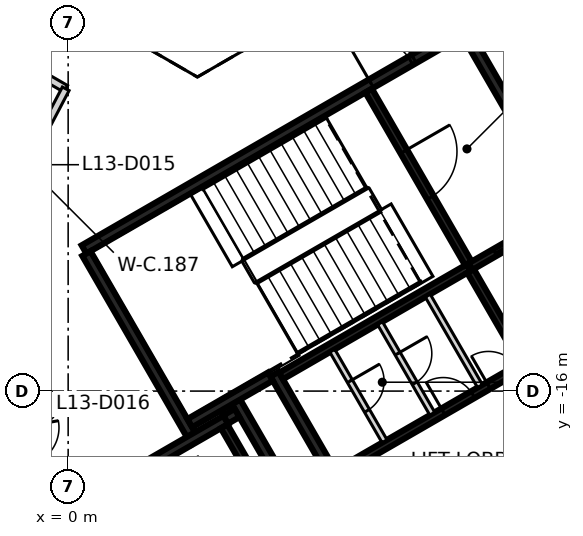
"""IFC4 building model, lengths in metres.
Left out: names, types, materials, properties, quantities, classifications, styles, units other than length and angle.
Written with IfcOpenShell. Run it as: python <this file> out.ifc"""

import sys

from ifc_helpers import new_model, si_unit, direction, frame, frame_2d, origin, place, context, subcontext, project, spatial, rectangle, extrude, element, fill, save


model = new_model("IFC4")
c1 = context("Model", 3, precision=1e-05, world=origin(), true_north=direction((0.0, 1.0)))
c2 = subcontext(c1, "Body", "Model", "MODEL_VIEW")
j1 = project(units=[si_unit("LENGTHUNIT", "METRE"), si_unit("PLANEANGLEUNIT", "RADIAN")], contexts=[c1])
p1 = place(None, origin())
s1 = spatial("IfcSite", under=j1, at=p1, CompositionType="ELEMENT")
p2 = place(p1, origin())
s2 = spatial("IfcBuilding", under=s1, at=p2, CompositionType="ELEMENT")
p3 = place(p2, frame((0.0, 0.0, 60.2)))
s3 = spatial("IfcBuildingStorey", under=s2, at=p3, CompositionType="ELEMENT", Elevation=60.2)
p4 = place(p3, frame((0.417, -12.273, 0.0), z_axis=(0.0, 0.0, 1.0), x_axis=(0.866021906294, 0.500006057782, 0.0)))
e1 = element("IfcWall", 1, at=p4, inside=s3, PredefinedType="SHEAR", context=c2, shape_type="SweptSolid", body=[
    extrude(rectangle(XDim=11.55, YDim=0.25, at=frame_2d((5.775, 0.0))), origin(), (0.0, 0.0, 1.0), 3.125),
])
p5 = place(p4, frame((10.025, 0.0, 0.0)))
e2 = element("IfcOpeningElement", 2, at=p5, cuts=e1, PredefinedType="OPENING", context=c2, shape_type="SweptSolid", body=[
    extrude(rectangle(XDim=1.2, YDim=2.1, at=frame_2d((0.6, 1.05))), frame((0.0, 0.135, 0.0), z_axis=(0.0, -1.0, 0.0), x_axis=(1.0, 0.0, 0.0)), (0.0, 0.0, 1.0), 0.27),
])
p6 = place(p4, frame((8.725, 0.0, 0.0)))
e3 = element("IfcOpeningElement", 3, at=p6, cuts=e1, PredefinedType="OPENING", context=c2, shape_type="SweptSolid", body=[
    extrude(rectangle(XDim=1.2, YDim=2.1, at=frame_2d((0.6, 1.05))), frame((0.0, 0.135, 0.0), z_axis=(0.0, -1.0, 0.0), x_axis=(1.0, 0.0, 0.0)), (0.0, 0.0, 1.0), 0.27),
])
p7 = place(p3, frame((3.235, -17.153, 0.0), z_axis=(0.0, 0.0, 1.0), x_axis=(-0.500008851346, 0.866020293397, 0.0)))
e4 = element("IfcWall", 4, at=p7, inside=s3, PredefinedType="SHEAR", context=c2, shape_type="SweptSolid", body=[
    extrude(rectangle(XDim=5.51, YDim=0.25, at=frame_2d((2.755, 0.0))), origin(), (0.0, 0.0, 1.0), 3.125),
])
p8 = place(p3, frame((10.483, -6.606, 0.0), z_axis=(0.0, 0.0, 1.0), x_axis=(0.49999885962, -0.866026062182, 0.0)))
e5 = element("IfcWall", 5, at=p8, inside=s3, PredefinedType="SHEAR", context=c2, shape_type="SweptSolid", body=[
    extrude(rectangle(XDim=5.225, YDim=0.25, at=frame_2d((2.612, 0.0))), origin(), (0.0, 0.0, 1.0), 3.125),
])
p9 = place(p3, frame((7.031, -18.327, 0.0), z_axis=(0.0, 0.0, 1.0), x_axis=(-0.499971222258, 0.866042017984, 0.0)))
e6 = element("IfcWall", 6, at=p9, inside=s3, PredefinedType="SHEAR", context=c2, shape_type="SweptSolid", body=[
    extrude(rectangle(XDim=3.2, YDim=0.25, at=frame_2d((1.6, 0.0))), origin(), (0.0, 0.0, 1.0), 3.125),
])
p10 = place(p3, frame((1.669, -18.19, 0.0), z_axis=(0.0, 0.0, 1.0), x_axis=(0.866042235819, 0.499970844928, 0.0)))
e7 = element("IfcWall", 7, at=p10, inside=s3, PredefinedType="SHEAR", context=c2, shape_type="SweptSolid", body=[
    extrude(rectangle(XDim=2.865, YDim=0.25, at=frame_2d((1.432, 0.0))), origin(), (0.0, 0.0, 1.0), 3.125),
])
p11 = place(p3, frame((4.414, -16.276, 0.0), z_axis=(0.0, 0.0, 1.0), x_axis=(0.500003324108, -0.866023484601, 0.0)))
e8 = element("IfcWall", 8, at=p11, inside=s3, PredefinedType="SHEAR", context=c2, shape_type="SweptSolid", body=[
    extrude(rectangle(XDim=3.085, YDim=0.25, at=frame_2d((1.542, 0.0))), origin(), (0.0, 0.0, 1.0), 3.125),
])
p12 = place(p3, frame((5.322, -15.619, 0.0), z_axis=(0.0, 0.0, 1.0), x_axis=(-0.866026229868, -0.499998569178, 0.0)))
e9 = element("IfcWall", 9, at=p12, inside=s3, PredefinedType="SHEAR", context=c2, shape_type="SweptSolid", body=[
    extrude(rectangle(XDim=2.449, YDim=0.25, at=frame_2d((1.225, 0.0))), origin(), (0.0, 0.0, 1.0), 3.125),
])
p13 = place(p3, frame((4.145, -16.749, 0.0), z_axis=(0.0, 0.0, 1.0), x_axis=(0.866185586049, 0.49972245349, 0.0)))
e10 = element("IfcWall", 10, at=p13, inside=s3, PredefinedType="SHEAR", context=c2, shape_type="SweptSolid", body=[
    extrude(rectangle(XDim=0.344, YDim=0.25, at=frame_2d((0.172, 0.0))), origin(), (0.0, 0.0, 1.0), 3.125),
])
p14 = place(p3, frame((9.052, -20.48, 0.0), z_axis=(0.0, 0.0, 1.0), x_axis=(0.866030299012, 0.499991521122, 0.0)))
e11 = element("IfcWall", 11, at=p14, inside=s3, PredefinedType="SHEAR", context=c2, shape_type="SweptSolid", body=[
    extrude(rectangle(XDim=6.1, YDim=0.2, at=frame_2d((3.05, 0.0))), origin(), (0.0, 0.0, 1.0), 3.125),
])
p15 = place(p14, frame((1.0, 0.0, 0.0)))
e12 = element("IfcOpeningElement", 12, at=p15, cuts=e11, PredefinedType="OPENING", context=c2, shape_type="SweptSolid", body=[
    extrude(rectangle(XDim=1.2, YDim=2.1, at=frame_2d((0.6, 1.05))), frame((0.0, 0.11, 0.0), z_axis=(0.0, -1.0, 0.0), x_axis=(1.0, 0.0, 0.0)), (0.0, 0.0, 1.0), 0.22),
])
p16 = place(p14, frame((4.05, 0.0, 0.0)))
e13 = element("IfcOpeningElement", 13, at=p16, cuts=e11, PredefinedType="OPENING", context=c2, shape_type="SweptSolid", body=[
    extrude(rectangle(XDim=1.2, YDim=2.1, at=frame_2d((0.6, 1.05))), frame((0.0, 0.11, 0.0), z_axis=(0.0, -1.0, 0.0), x_axis=(1.0, 0.0, 0.0)), (0.0, 0.0, 1.0), 0.22),
])
p17 = place(p3, frame((10.538, -12.752, 0.0), z_axis=(0.0, 0.0, 1.0), x_axis=(-0.866038630372, -0.499977090179, 0.0)))
e14 = element("IfcWall", 14, at=p17, inside=s3, PredefinedType="SHEAR", context=c2, shape_type="SweptSolid", body=[
    extrude(rectangle(XDim=5.699, YDim=0.2, at=frame_2d((2.85, 0.0))), origin(), (0.0, 0.0, 1.0), 3.125),
])
p18 = place(p3, frame((7.077, -18.156, 0.0), z_axis=(0.0, 0.0, 1.0), x_axis=(0.866038630372, 0.499977090179, 0.0)))
e15 = element("IfcWall", 15, at=p18, inside=s3, PredefinedType="SHEAR", context=c2, shape_type="SweptSolid", body=[
    extrude(rectangle(XDim=5.699, YDim=0.2, at=frame_2d((2.85, 0.0))), origin(), (0.0, 0.0, 1.0), 3.125),
])
p19 = place(p18, frame((3.224, 0.0, 0.0)))
e16 = element("IfcOpeningElement", 16, at=p19, cuts=e15, PredefinedType="OPENING", context=c2, shape_type="SweptSolid", body=[
    extrude(rectangle(XDim=0.9, YDim=2.1, at=frame_2d((0.45, 1.05))), frame((0.0, 0.11, 0.0), z_axis=(0.0, -1.0, 0.0), x_axis=(1.0, 0.0, 0.0)), (0.0, 0.0, 1.0), 0.22),
])
p20 = place(p18, frame((4.599, 0.0, 0.0)))
e17 = element("IfcOpeningElement", 17, at=p20, cuts=e15, PredefinedType="OPENING", context=c2, shape_type="SweptSolid", body=[
    extrude(rectangle(XDim=0.9, YDim=2.1, at=frame_2d((0.45, 1.05))), frame((0.0, 0.11, 0.0), z_axis=(0.0, -1.0, 0.0), x_axis=(1.0, 0.0, 0.0)), (0.0, 0.0, 1.0), 0.22),
])
p21 = place(p3, frame((7.906, -8.094, 0.0), z_axis=(0.0, 0.0, 1.0), x_axis=(0.500024287448, -0.866011380966, 0.0)))
e18 = element("IfcWall", 18, at=p21, inside=s3, PredefinedType="SHEAR", context=c2, shape_type="SweptSolid", body=[
    extrude(rectangle(XDim=5.251, YDim=0.2, at=frame_2d((2.625, 0.0))), origin(), (0.0, 0.0, 1.0), 3.125),
])
p22 = place(p21, frame((1.849, 0.0, 0.0)))
e19 = element("IfcOpeningElement", 19, at=p22, cuts=e18, PredefinedType="OPENING", context=c2, shape_type="SweptSolid", body=[
    extrude(rectangle(XDim=1.4, YDim=2.1, at=frame_2d((0.7, 1.05))), frame((0.0, 0.11, 0.0), z_axis=(0.0, -1.0, 0.0), x_axis=(1.0, 0.0, 0.0)), (0.0, 0.0, 1.0), 0.22),
])
p23 = place(p3, frame((5.503, -19.352, 0.0), z_axis=(0.0, 0.0, 1.0), x_axis=(-0.499986818241, 0.866033014143, 0.0)))
e20 = element("IfcWall", 20, at=p23, inside=s3, PredefinedType="SHEAR", context=c2, shape_type="SweptSolid", body=[
    extrude(rectangle(XDim=2.798, YDim=0.2, at=frame_2d((1.399, 0.0))), origin(), (0.0, 0.0, 1.0), 3.125),
])
p24 = place(p23, frame((0.949, 0.0, 0.0)))
e21 = element("IfcOpeningElement", 21, at=p24, cuts=e20, PredefinedType="OPENING", context=c2, shape_type="SweptSolid", body=[
    extrude(rectangle(XDim=0.9, YDim=2.1, at=frame_2d((0.45, 1.05))), frame((0.0, 0.11, 0.0), z_axis=(0.0, -1.0, 0.0), x_axis=(1.0, 0.0, 0.0)), (0.0, 0.0, 1.0), 0.22),
])
p25 = place(p3, frame((11.963, -15.22, 0.0), z_axis=(0.0, 0.0, 1.0), x_axis=(-0.500034990121, 0.866005201286, 0.0)))
e22 = element("IfcWall", 22, at=p25, inside=s3, PredefinedType="SHEAR", context=c2, shape_type="SweptSolid", body=[
    extrude(rectangle(XDim=2.75, YDim=0.2, at=frame_2d((1.375, 0.0))), origin(), (0.0, 0.0, 1.0), 3.125),
])
p26 = place(p3, frame((10.587, -12.723, 0.0), z_axis=(0.0, 0.0, 1.0), x_axis=(0.866037306777, 0.499979382845, 0.0)))
e23 = element("IfcWall", 23, at=p26, inside=s3, PredefinedType="SHEAR", context=c2, shape_type="SweptSolid", body=[
    extrude(rectangle(XDim=2.742, YDim=0.2, at=frame_2d((1.371, 0.0))), origin(), (0.0, 0.0, 1.0), 3.125),
])
p27 = place(p26, frame((0.743, 0.0, 0.0)))
e24 = element("IfcOpeningElement", 24, at=p27, cuts=e23, PredefinedType="OPENING", context=c2, shape_type="SweptSolid", body=[
    extrude(rectangle(XDim=1.3, YDim=2.1, at=frame_2d((0.65, 1.05))), frame((0.0, 0.11, 0.0), z_axis=(0.0, -1.0, 0.0), x_axis=(1.0, 0.0, 0.0)), (0.0, 0.0, 1.0), 0.22),
])
p28 = place(p3, frame((8.207, -14.214, 0.0), z_axis=(0.0, 0.0, 1.0), x_axis=(0.50002746344, -0.86600954718, 0.0)))
e25 = element("IfcWall", 25, at=p28, inside=s3, PredefinedType="PARTITIONING", context=c2, shape_type="SweptSolid", body=[
    extrude(rectangle(XDim=2.748, YDim=0.15, at=frame_2d((1.374, 0.0))), origin(), (0.0, 0.0, 1.0), 3.125),
])
p29 = place(p28, frame((0.924, 0.0, 0.0)))
e26 = element("IfcOpeningElement", 26, at=p29, cuts=e25, PredefinedType="OPENING", context=c2, shape_type="SweptSolid", body=[
    extrude(rectangle(XDim=0.9, YDim=2.1, at=frame_2d((0.45, 1.05))), frame((0.0, 0.085, 0.0), z_axis=(0.0, -1.0, 0.0), x_axis=(1.0, 0.0, 0.0)), (0.0, 0.0, 1.0), 0.17),
])
p30 = place(p3, frame((9.462, -13.489, 0.0), z_axis=(0.0, 0.0, 1.0), x_axis=(0.499988999718, -0.866031754707, 0.0)))
e27 = element("IfcWall", 27, at=p30, inside=s3, PredefinedType="PARTITIONING", context=c2, shape_type="SweptSolid", body=[
    extrude(rectangle(XDim=2.749, YDim=0.15, at=frame_2d((1.374, 0.0))), origin(), (0.0, 0.0, 1.0), 3.125),
])
p31 = place(p3, frame((6.951, -14.939, 0.0), z_axis=(0.0, 0.0, 1.0), x_axis=(0.499988999718, -0.866031754707, 0.0)))
e28 = element("IfcWall", 28, at=p31, inside=s3, PredefinedType="PARTITIONING", context=c2, shape_type="SweptSolid", body=[
    extrude(rectangle(XDim=2.749, YDim=0.15, at=frame_2d((1.374, 0.0))), origin(), (0.0, 0.0, 1.0), 3.125),
])
p32 = place(p31, frame((0.924, 0.0, 0.0)))
e29 = element("IfcOpeningElement", 29, at=p32, cuts=e28, PredefinedType="OPENING", context=c2, shape_type="SweptSolid", body=[
    extrude(rectangle(XDim=0.9, YDim=2.1, at=frame_2d((0.45, 1.05))), frame((0.0, 0.085, 0.0), z_axis=(0.0, -1.0, 0.0), x_axis=(1.0, 0.0, 0.0)), (0.0, 0.0, 1.0), 0.17),
])
p33 = place(p3, frame((-7.589, -3.702, 0.0), z_axis=(0.0, 0.0, 1.0), x_axis=(0.865995139556, -0.500052415518, 0.0)))
e30 = element("IfcWall", 30, at=p33, inside=s3, PredefinedType="PARTITIONING", context=c2, shape_type="SweptSolid", body=[
    extrude(rectangle(XDim=8.689, YDim=0.2, at=frame_2d((4.344, 0.0))), origin(), (0.0, 0.0, 1.0), 3.125),
])
p34 = place(p33, frame((0.749, 0.0, 0.0)))
e31 = element("IfcOpeningElement", 31, at=p34, cuts=e30, PredefinedType="OPENING", context=c2, shape_type="SweptSolid", body=[
    extrude(rectangle(XDim=1.0, YDim=2.1, at=frame_2d((0.5, 1.05))), frame((0.0, 0.11, 0.0), z_axis=(0.0, -1.0, 0.0), x_axis=(1.0, 0.0, 0.0)), (0.0, 0.0, 1.0), 0.22),
])
p35 = place(p33, frame((5.819, 0.0, 0.0)))
e32 = element("IfcOpeningElement", 32, at=p35, cuts=e30, PredefinedType="OPENING", context=c2, shape_type="SweptSolid", body=[
    extrude(rectangle(XDim=0.95, YDim=2.1, at=frame_2d((0.475, 1.05))), frame((0.0, 0.11, 0.0), z_axis=(0.0, -1.0, 0.0), x_axis=(1.0, 0.0, 0.0)), (0.0, 0.0, 1.0), 0.22),
])
p36 = place(p3, frame((-2.162, -12.041, 0.0), z_axis=(0.0, 0.0, 1.0), x_axis=(0.464956890881, 0.885333321197, 0.0)))
e33 = element("IfcWall", 33, at=p36, inside=s3, PredefinedType="PARTITIONING", context=c2, shape_type="SweptSolid", body=[
    extrude(rectangle(XDim=4.512, YDim=0.2, at=frame_2d((2.256, 0.0))), origin(), (0.0, 0.0, 1.0), 3.125),
])
p37 = place(p36, frame((1.756, 0.0, 0.0)))
e34 = element("IfcOpeningElement", 34, at=p37, cuts=e33, PredefinedType="OPENING", context=c2, shape_type="SweptSolid", body=[
    extrude(rectangle(XDim=1.0, YDim=2.1, at=frame_2d((0.5, 1.05))), frame((0.0, 0.11, 0.0), z_axis=(0.0, -1.0, 0.0), x_axis=(1.0, 0.0, 0.0)), (0.0, 0.0, 1.0), 0.22),
])
p38 = place(p27, origin())
e35 = element("IfcDoor", 35, at=p38, inside=s3, OperationType="SLIDING_TO_RIGHT", PredefinedType="DOOR", context=c2, shape_type="SweptSolid", body=[
    extrude(rectangle(XDim=1.3, YDim=2.1, at=frame_2d((0.65, 1.05))), frame((0.0, 0.025, 0.0), z_axis=(0.0, -1.0, 0.0), x_axis=(1.0, 0.0, 0.0)), (0.0, 0.0, 1.0), 0.05),
])
fill(e24, e35)
p39 = place(p5, origin())
e36 = element("IfcDoor", 36, at=p39, inside=s3, OperationType="SINGLE_SWING_LEFT", PredefinedType="DOOR", context=c2, shape_type="SweptSolid", body=[
    extrude(rectangle(XDim=1.2, YDim=2.1, at=frame_2d((0.6, 1.05))), frame((0.0, 0.025, 0.0), z_axis=(0.0, -1.0, 0.0), x_axis=(1.0, 0.0, 0.0)), (0.0, 0.0, 1.0), 0.05),
])
fill(e2, e36)
p40 = place(p6, origin())
e37 = element("IfcDoor", 37, at=p40, inside=s3, OperationType="SINGLE_SWING_RIGHT", PredefinedType="DOOR", context=c2, shape_type="SweptSolid", body=[
    extrude(rectangle(XDim=1.2, YDim=2.1, at=frame_2d((0.6, 1.05))), frame((0.0, 0.025, 0.0), z_axis=(0.0, -1.0, 0.0), x_axis=(1.0, 0.0, 0.0)), (0.0, 0.0, 1.0), 0.05),
])
fill(e3, e37)
p41 = place(p22, origin())
e38 = element("IfcDoor", 38, at=p41, inside=s3, OperationType="SINGLE_SWING_RIGHT", PredefinedType="DOOR", context=c2, shape_type="SweptSolid", body=[
    extrude(rectangle(XDim=1.4, YDim=2.1, at=frame_2d((0.7, 1.05))), frame((0.0, 0.025, 0.0), z_axis=(0.0, -1.0, 0.0), x_axis=(1.0, 0.0, 0.0)), (0.0, 0.0, 1.0), 0.05),
])
fill(e19, e38)
p42 = place(p19, origin())
e39 = element("IfcDoor", 39, at=p42, inside=s3, OperationType="SINGLE_SWING_LEFT", PredefinedType="DOOR", context=c2, shape_type="SweptSolid", body=[
    extrude(rectangle(XDim=0.9, YDim=2.1, at=frame_2d((0.45, 1.05))), frame((0.0, 0.025, 0.0), z_axis=(0.0, -1.0, 0.0), x_axis=(1.0, 0.0, 0.0)), (0.0, 0.0, 1.0), 0.05),
])
fill(e16, e39)
p43 = place(p20, origin())
e40 = element("IfcDoor", 40, at=p43, inside=s3, OperationType="SINGLE_SWING_RIGHT", PredefinedType="DOOR", context=c2, shape_type="SweptSolid", body=[
    extrude(rectangle(XDim=0.9, YDim=2.1, at=frame_2d((0.45, 1.05))), frame((0.0, 0.025, 0.0), z_axis=(0.0, -1.0, 0.0), x_axis=(1.0, 0.0, 0.0)), (0.0, 0.0, 1.0), 0.05),
])
fill(e17, e40)
p44 = place(p29, origin())
e41 = element("IfcDoor", 41, at=p44, inside=s3, OperationType="SINGLE_SWING_RIGHT", PredefinedType="DOOR", context=c2, shape_type="SweptSolid", body=[
    extrude(rectangle(XDim=0.9, YDim=2.1, at=frame_2d((0.45, 1.05))), frame((0.0, 0.025, 0.0), z_axis=(0.0, -1.0, 0.0), x_axis=(1.0, 0.0, 0.0)), (0.0, 0.0, 1.0), 0.05),
])
fill(e26, e41)
p45 = place(p32, origin())
e42 = element("IfcDoor", 42, at=p45, inside=s3, OperationType="SINGLE_SWING_LEFT", PredefinedType="DOOR", context=c2, shape_type="SweptSolid", body=[
    extrude(rectangle(XDim=0.9, YDim=2.1, at=frame_2d((0.45, 1.05))), frame((0.0, 0.025, 0.0), z_axis=(0.0, -1.0, 0.0), x_axis=(1.0, 0.0, 0.0)), (0.0, 0.0, 1.0), 0.05),
])
fill(e29, e42)
save(model, sys.argv[1])
